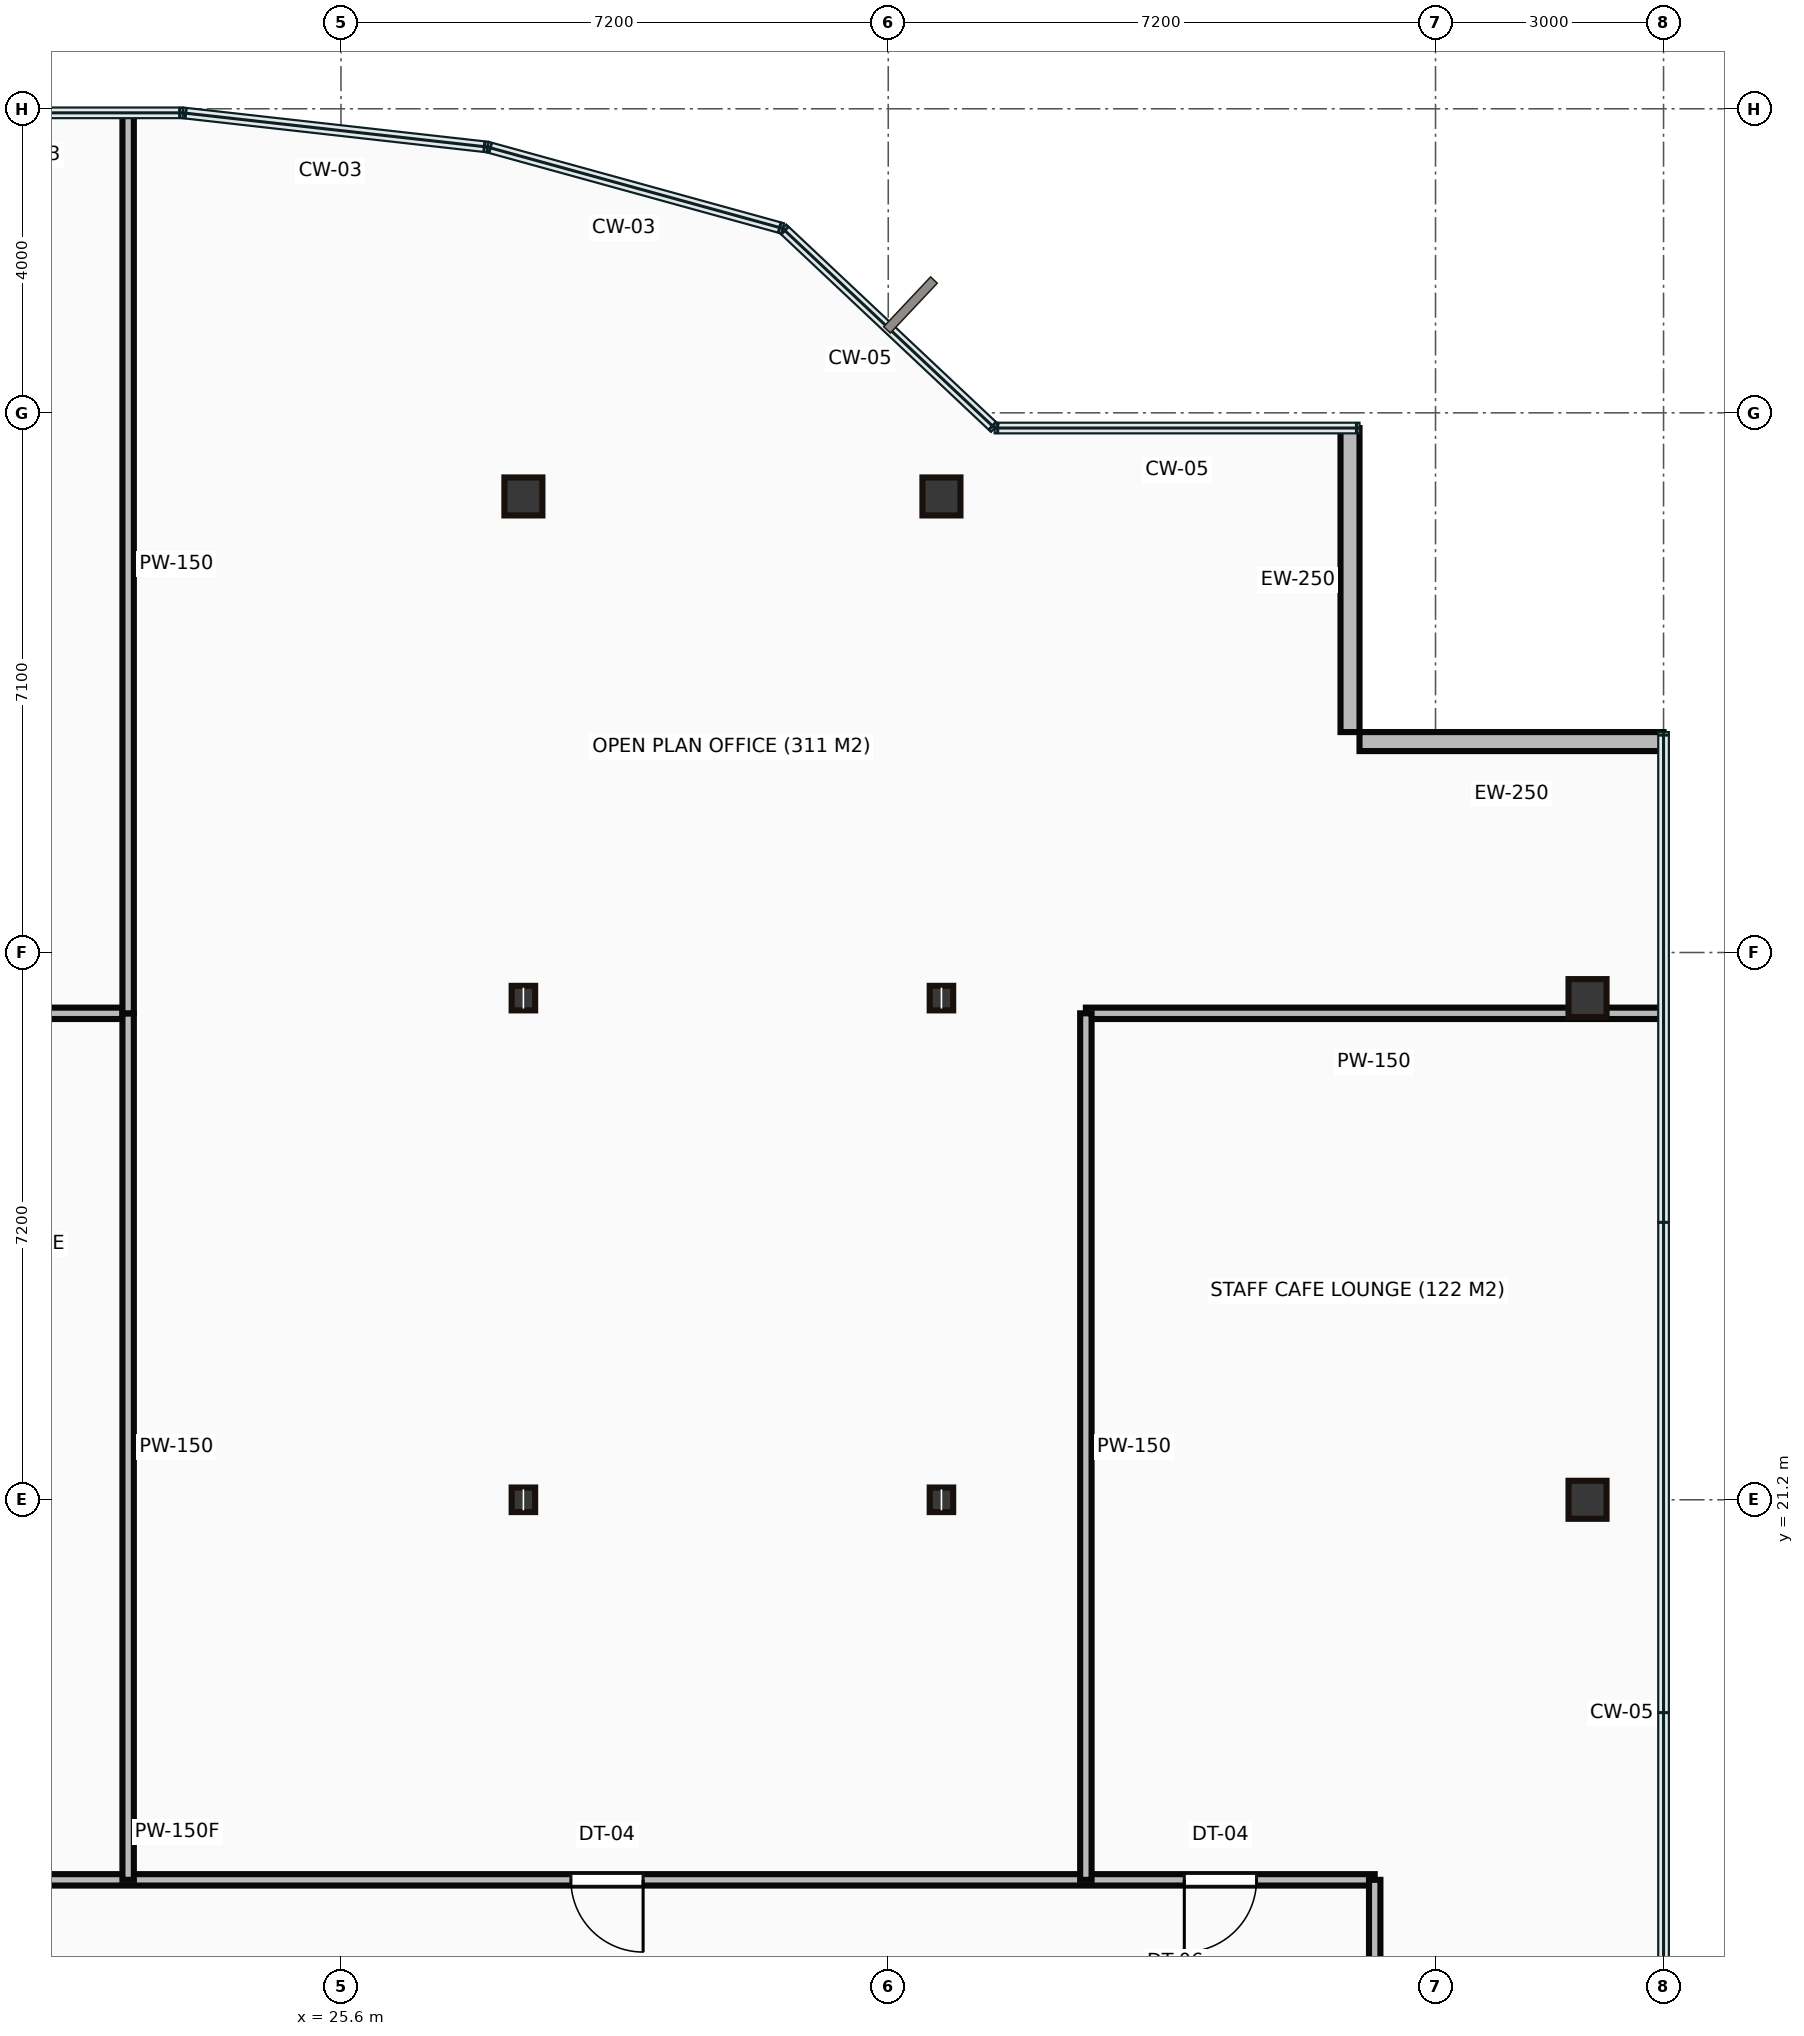
"""IFC4 building model, lengths in metres.
Left out: names, types, materials, properties, quantities, classifications, styles, units other than length and angle.
Written with IfcOpenShell. Run it as: python <this file> out.ifc"""

import sys

from ifc_helpers import new_model, si_unit, direction, frame, frame_2d, origin, origin_2d, place, context, subcontext, project, spatial, rectangle, hollow_rectangle, i_section, extrude, source, transform, mapped, element, fill, save


model = new_model("IFC4")
c1 = context("Model", 3, precision=1e-05, world=origin(), true_north=direction((0.0, 1.0)))
c2 = subcontext(c1, "Body", "Model", "MODEL_VIEW")
j1 = project(units=[si_unit("LENGTHUNIT", "METRE"), si_unit("PLANEANGLEUNIT", "RADIAN")], contexts=[c1])
p1 = place(None, origin())
s1 = spatial("IfcSite", under=j1, at=p1, CompositionType="ELEMENT")
p2 = place(p1, origin())
s2 = spatial("IfcBuilding", under=s1, at=p2, CompositionType="ELEMENT")
p3 = place(p2, frame((0.0, 0.0, 214.15)))
s3 = spatial("IfcBuildingStorey", under=s2, at=p3, CompositionType="ELEMENT", Elevation=214.15)
m1 = source(origin(), c2, "Body", "SweptSolid", [
    extrude(i_section(OverallWidth=0.309, OverallDepth=0.323, WebThickness=0.014, FlangeThickness=0.023, at=origin_2d()), origin(), (0.0, 0.0, 1.0), 3.65),
])
for number, where, z_axis, x_axis in (
    (1, (28.0, 21.2, 0.0), (0.0, 0.0, 1.0), (1.0, 0.0, 0.0)),
    (2, (28.0, 27.8, 0.0), (0.0, 0.0, 1.0), (1.0, 0.0, 0.0)),
):
    element("IfcColumn", number, at=place(p3, frame(where, z_axis=z_axis, x_axis=x_axis)), inside=s3, PredefinedType="COLUMN", context=c2, shape_type="MappedRepresentation", body=[
        mapped(m1, transform((0.0, 0.0, 0.0))),
    ])
m2 = source(origin(), c2, "Body", "SweptSolid", [
    extrude(hollow_rectangle(XDim=0.5, YDim=0.5, WallThickness=0.022, at=origin_2d()), origin(), (0.0, 0.0, 1.0), 3.65),
])
p4 = place(p3, frame((28.0, 34.4, 0.0), z_axis=(0.0, 0.0, 1.0), x_axis=(1.0, 0.0, 0.0)))
e3 = element("IfcColumn", 3, at=p4, inside=s3, PredefinedType="COLUMN", context=c2, shape_type="MappedRepresentation", body=[
    mapped(m2, transform((0.0, 0.0, 0.0))),
])
for number, where, z_axis, x_axis in (
    (4, (33.5, 21.2, 0.0), (0.0, 0.0, 1.0), (1.0, 0.0, 0.0)),
    (5, (33.5, 27.8, 0.0), (0.0, 0.0, 1.0), (1.0, 0.0, 0.0)),
):
    element("IfcColumn", number, at=place(p3, frame(where, z_axis=z_axis, x_axis=x_axis)), inside=s3, PredefinedType="COLUMN", context=c2, shape_type="MappedRepresentation", body=[
        mapped(m1, transform((0.0, 0.0, 0.0))),
    ])
for number, where, z_axis, x_axis in (
    (6, (33.5, 34.4, 0.0), (0.0, 0.0, 1.0), (1.0, 0.0, 0.0)),
    (7, (42.0, 21.2, 0.0), (0.0, 0.0, 1.0), (1.0, 0.0, 0.0)),
    (8, (42.0, 27.8, 0.0), (0.0, 0.0, 1.0), (1.0, 0.0, 0.0)),
):
    element("IfcColumn", number, at=place(p3, frame(where, z_axis=z_axis, x_axis=x_axis)), inside=s3, PredefinedType="COLUMN", context=c2, shape_type="MappedRepresentation", body=[
        mapped(m2, transform((0.0, 0.0, 0.0))),
    ])
m3 = source(origin(), c2, "Body", "SweptSolid", [
    extrude(rectangle(XDim=4.0, YDim=0.25, at=frame_2d((2.0, 0.0))), origin(), (0.0, 0.0, 1.0), 3.4),
])
for number, where, z_axis, x_axis in (
    (9, (43.0, 31.175, 0.0), (0.0, 0.0, 1.0), (-1.0, 0.0, 0.0)),
    (10, (38.875, 31.3, 0.0), (0.0, 0.0, 1.0), (0.0, 1.0, 0.0)),
):
    element("IfcWall", number, at=place(p3, frame(where, z_axis=z_axis, x_axis=x_axis)), inside=s3, PredefinedType="STANDARD", context=c2, shape_type="MappedRepresentation", body=[
        mapped(m3, transform((0.0, 0.0, 0.0))),
    ])
m4 = source(origin(), c2, "Body", "SweptSolid", [
    extrude(rectangle(XDim=20.2, YDim=0.15, at=frame_2d((10.1, 0.0))), origin(), (0.0, 0.0, 1.0), 3.4),
])
p5 = place(p3, frame((19.0, 16.2, 0.0), z_axis=(0.0, 0.0, 1.0), x_axis=(1.0, 0.0, 0.0)))
e11 = element("IfcWall", 11, at=p5, inside=s3, PredefinedType="PARTITIONING", context=c2, shape_type="MappedRepresentation", body=[
    mapped(m4, transform((0.0, 0.0, 0.0))),
])
p6 = place(p5, frame((9.625, 0.0, 0.0)))
e12 = element("IfcOpeningElement", 12, at=p6, cuts=e11, PredefinedType="OPENING", context=c2, shape_type="SweptSolid", body=[
    extrude(rectangle(XDim=0.95, YDim=2.15, at=frame_2d((0.475, 1.075))), frame((0.0, 0.085, 0.0), z_axis=(0.0, -1.0, 0.0), x_axis=(1.0, 0.0, 0.0)), (0.0, 0.0, 1.0), 0.17),
])
p7 = place(p5, frame((17.695, 0.0, 0.0)))
e13 = element("IfcOpeningElement", 13, at=p7, cuts=e11, PredefinedType="OPENING", context=c2, shape_type="SweptSolid", body=[
    extrude(rectangle(XDim=0.95, YDim=2.15, at=frame_2d((0.475, 1.075))), frame((0.0, 0.085, 0.0), z_axis=(0.0, -1.0, 0.0), x_axis=(1.0, 0.0, 0.0)), (0.0, 0.0, 1.0), 0.17),
])
m5 = source(origin(), c2, "Body", "SweptSolid", [
    extrude(rectangle(XDim=2.2, YDim=0.15, at=frame_2d((1.1, 0.0))), origin(), (0.0, 0.0, 1.0), 3.4),
])
p8 = place(p3, frame((39.2, 16.2, 0.0), z_axis=(0.0, 0.0, 1.0), x_axis=(0.0, -1.0, 0.0)))
e14 = element("IfcWall", 14, at=p8, inside=s3, PredefinedType="PARTITIONING", context=c2, shape_type="MappedRepresentation", body=[
    mapped(m5, transform((0.0, 0.0, 0.0))),
])
m6 = source(origin(), c2, "Body", "SweptSolid", [
    extrude(rectangle(XDim=3.8, YDim=0.15, at=frame_2d((1.9, 0.0))), origin(), (0.0, 0.0, 1.0), 3.4),
])
p9 = place(p3, frame((22.8, 27.6, 0.0), z_axis=(0.0, 0.0, 1.0), x_axis=(-1.0, 0.0, 0.0)))
e15 = element("IfcWall", 15, at=p9, inside=s3, PredefinedType="PARTITIONING", context=c2, shape_type="MappedRepresentation", body=[
    mapped(m6, transform((0.0, 0.0, 0.0))),
])
m7 = source(origin(), c2, "Body", "SweptSolid", [
    extrude(rectangle(XDim=11.4, YDim=0.15, at=frame_2d((5.7, 0.0))), origin(), (0.0, 0.0, 1.0), 3.4),
])
p10 = place(p3, frame((22.8, 27.6, 0.0), z_axis=(0.0, 0.0, 1.0), x_axis=(0.0, -1.0, 0.0)))
e16 = element("IfcWall", 16, at=p10, inside=s3, PredefinedType="PARTITIONING", context=c2, shape_type="MappedRepresentation", body=[
    mapped(m7, transform((0.0, 0.0, 0.0))),
])
m8 = source(origin(), c2, "Body", "SweptSolid", [
    extrude(rectangle(XDim=11.827, YDim=0.15, at=frame_2d((5.913, 0.0))), origin(), (0.0, 0.0, 1.0), 3.4),
])
p11 = place(p3, frame((22.8, 39.427, 0.0), z_axis=(0.0, 0.0, 1.0), x_axis=(0.0, -1.0, 0.0)))
e17 = element("IfcWall", 17, at=p11, inside=s3, PredefinedType="PARTITIONING", context=c2, shape_type="MappedRepresentation", body=[
    mapped(m8, transform((0.0, 0.0, 0.0))),
])
m9 = source(origin(), c2, "Body", "SweptSolid", [
    extrude(rectangle(XDim=7.58, YDim=0.15, at=frame_2d((3.79, 0.0))), origin(), (0.0, 0.0, 1.0), 3.4),
])
p12 = place(p3, frame((42.98, 27.6, 0.0), z_axis=(0.0, 0.0, 1.0), x_axis=(-1.0, 0.0, 0.0)))
e18 = element("IfcWall", 18, at=p12, inside=s3, PredefinedType="PARTITIONING", context=c2, shape_type="MappedRepresentation", body=[
    mapped(m9, transform((0.0, 0.0, 0.0))),
])
p13 = place(p3, frame((35.4, 27.6, 0.0), z_axis=(0.0, 0.0, 1.0), x_axis=(0.0, -1.0, 0.0)))
e19 = element("IfcWall", 19, at=p13, inside=s3, PredefinedType="PARTITIONING", context=c2, shape_type="MappedRepresentation", body=[
    mapped(m7, transform((0.0, 0.0, 0.0))),
])
m10 = source(origin(), c2, "Body", "SweptSolid", [
    extrude(rectangle(XDim=0.95, YDim=2.15, at=frame_2d((0.475, 1.075))), frame((0.0, 0.025, 0.0), z_axis=(0.0, -1.0, 0.0), x_axis=(1.0, 0.0, 0.0)), (0.0, 0.0, 1.0), 0.05),
])
p14 = place(p6, origin())
e20 = element("IfcDoor", 20, at=p14, inside=s3, OperationType="SINGLE_SWING_RIGHT", PredefinedType="DOOR", context=c2, shape_type="MappedRepresentation", body=[
    mapped(m10, transform((0.0, 0.0, 0.0))),
])
fill(e12, e20)
p15 = place(p7, origin())
e21 = element("IfcDoor", 21, at=p15, inside=s3, OperationType="SINGLE_SWING_LEFT", PredefinedType="DOOR", context=c2, shape_type="MappedRepresentation", body=[
    mapped(m10, transform((0.0, 0.0, 0.0))),
])
fill(e13, e21)
save(model, sys.argv[1])
